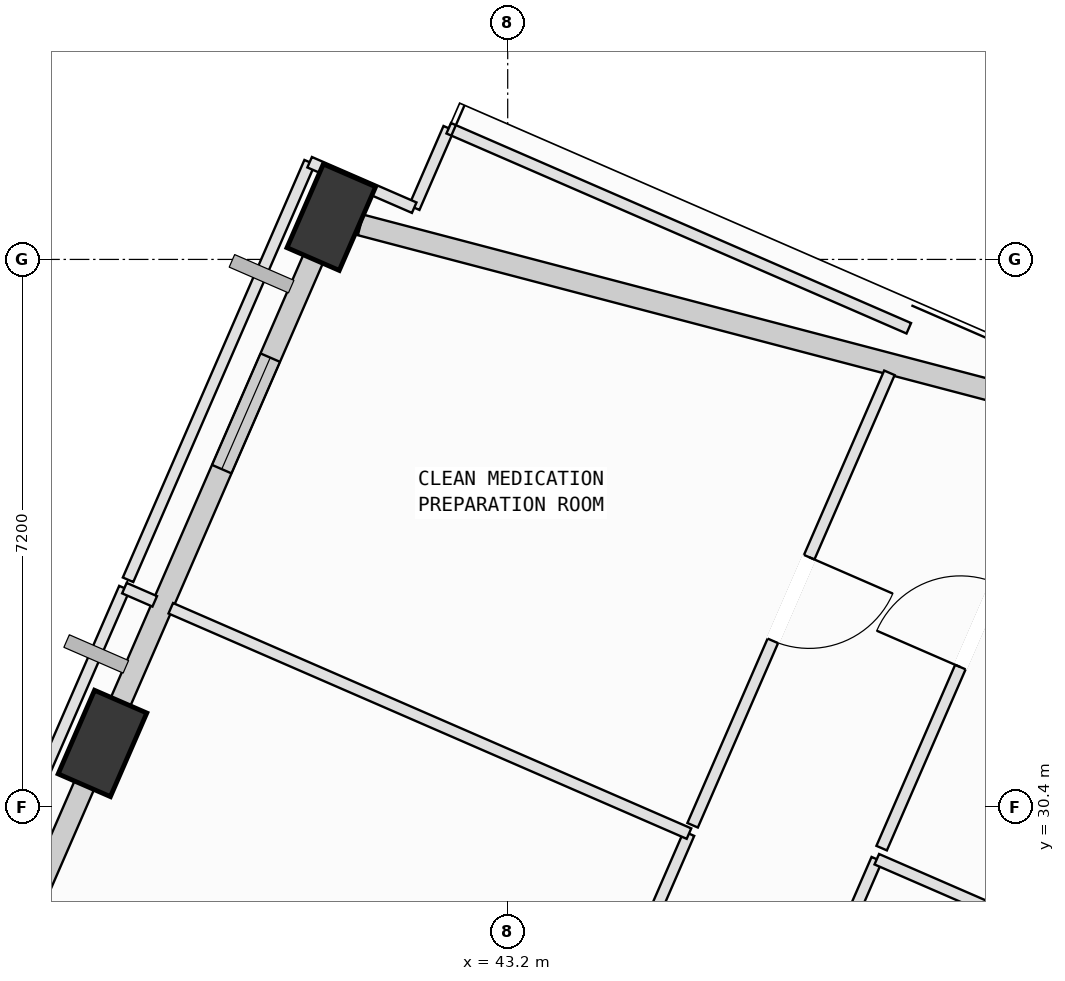
"""IFC4 building model, lengths in metres.
Left out: names, types, materials, properties, quantities, classifications, styles, units other than length and angle.
Written with IfcOpenShell. Run it as: python <this file> out.ifc"""

import sys

from ifc_helpers import new_model, si_unit, direction, frame, frame_2d, origin, origin_2d, place, context, subcontext, project, spatial, rectangle, extrude, element, fill, save


model = new_model("IFC4")
c1 = context("Model", 3, precision=1e-05, world=origin(), true_north=direction((0.0, 1.0)))
c2 = subcontext(c1, "Body", "Model", "MODEL_VIEW")
j1 = project(units=[si_unit("LENGTHUNIT", "METRE"), si_unit("PLANEANGLEUNIT", "RADIAN")], contexts=[c1])
p1 = place(None, origin())
s1 = spatial("IfcSite", under=j1, at=p1, CompositionType="ELEMENT")
p2 = place(p1, origin())
s2 = spatial("IfcBuilding", under=s1, at=p2, CompositionType="ELEMENT")
p3 = place(p2, frame((0.0, 0.0, 316.6)))
s3 = spatial("IfcBuildingStorey", under=s2, at=p3, CompositionType="ELEMENT", Elevation=316.6)
for number, where, z_axis, x_axis in (
    (1, (40.879, 38.155, 0.002), (0.0, 0.0, 1.0), (0.399, 0.917, 0.0)),
    (2, (37.868, 31.231, 0.002), (0.0, 0.0, 1.0), (0.399, 0.917, 0.0)),
):
    element("IfcColumn", number, at=place(p3, frame(where, z_axis=z_axis, x_axis=x_axis)), inside=s3, PredefinedType="COLUMN", context=c2, shape_type="SweptSolid", body=[
        extrude(rectangle(XDim=1.2, YDim=0.75, at=origin_2d()), origin(), (0.0, 0.0, 1.0), 3.996),
    ])
p4 = place(p3, frame((41.264, 38.054, 0.0), z_axis=(0.0, 0.0, 1.0), x_axis=(0.967228971308, -0.253905724755, 0.0)))
e3 = element("IfcWall", 3, at=p4, inside=s3, PredefinedType="SOLIDWALL", context=c2, shape_type="SweptSolid", body=[
    extrude(rectangle(XDim=9.02, YDim=0.28, at=frame_2d((4.51, 0.0))), origin(), (0.0, 0.0, 1.0), 3.265),
])
p5 = place(p3, frame((38.027, 31.596, 0.0), z_axis=(0.0, 0.0, 1.0), x_axis=(0.398764437463, 0.917053391802, 0.0)))
e4 = element("IfcWall", 4, at=p5, inside=s3, PredefinedType="SOLIDWALL", context=c2, shape_type="SweptSolid", body=[
    extrude(rectangle(XDim=6.755, YDim=0.28, at=frame_2d((3.377, 0.0))), origin(), (0.0, 0.0, 1.0), 3.265),
])
p6 = place(p5, frame((3.538, 0.0, 0.75)))
e5 = element("IfcOpeningElement", 5, at=p6, cuts=e4, PredefinedType="OPENING", context=c2, shape_type="SweptSolid", body=[
    extrude(rectangle(XDim=1.6, YDim=1.95, at=frame_2d((0.8, 0.975))), frame((0.0, 0.15, 0.0), z_axis=(0.0, -1.0, 0.0), x_axis=(1.0, 0.0, 0.0)), (0.0, 0.0, 1.0), 0.3),
])
p7 = place(p3, frame((35.156, 24.993, 0.0), z_axis=(0.0, 0.0, 1.0), x_axis=(0.398758169539, 0.917056117272, 0.0)))
e6 = element("IfcWall", 6, at=p7, inside=s3, PredefinedType="SOLIDWALL", context=c2, shape_type="SweptSolid", body=[
    extrude(rectangle(XDim=6.405, YDim=0.28, at=frame_2d((3.202, 0.0))), origin(), (0.0, 0.0, 1.0), 3.265),
])
p8 = place(p7, frame((2.202, 0.0, 0.75)))
e7 = element("IfcOpeningElement", 7, at=p8, cuts=e6, PredefinedType="OPENING", context=c2, shape_type="SweptSolid", body=[
    extrude(rectangle(XDim=2.0, YDim=1.95, at=frame_2d((1.0, 0.975))), frame((0.0, 0.15, 0.0), z_axis=(0.0, -1.0, 0.0), x_axis=(1.0, 0.0, 0.0)), (0.0, 0.0, 1.0), 0.3),
])
p9 = place(p3, frame((42.856, 17.749, 0.0), z_axis=(0.0, 0.0, 1.0), x_axis=(0.398751440491, 0.917059043195, 0.0)))
e8 = element("IfcWall", 8, at=p9, inside=s3, PredefinedType="PARTITIONING", context=c2, shape_type="SweptSolid", body=[
    extrude(rectangle(XDim=13.041, YDim=0.15, at=frame_2d((6.52, 0.0))), origin(), (0.0, 0.0, 1.0), 3.78),
])
p10 = place(p9, frame((5.92, 0.0, 0.0)))
e9 = element("IfcOpeningElement", 9, at=p10, cuts=e8, PredefinedType="OPENING", context=c2, shape_type="SweptSolid", body=[
    extrude(rectangle(XDim=1.2, YDim=2.15, at=frame_2d((0.6, 1.075))), frame((0.0, 0.085, 0.0), z_axis=(0.0, -1.0, 0.0), x_axis=(1.0, 0.0, 0.0)), (0.0, 0.0, 1.0), 0.17),
])
p11 = place(p3, frame((48.056, 29.708, 0.0), z_axis=(0.0, 0.0, 1.0), x_axis=(0.917068265028, -0.398730231207, 0.0)))
e10 = element("IfcWall", 10, at=p11, inside=s3, PredefinedType="PARTITIONING", context=c2, shape_type="SweptSolid", body=[
    extrude(rectangle(XDim=10.834, YDim=0.15, at=frame_2d((5.417, 0.0))), origin(), (0.0, 0.0, 1.0), 3.78),
])
p12 = place(p3, frame((48.12, 29.854, 0.0), z_axis=(0.0, 0.0, 1.0), x_axis=(0.398700984872, 0.917080980428, 0.0)))
e11 = element("IfcWall", 11, at=p12, inside=s3, PredefinedType="PARTITIONING", context=c2, shape_type="SweptSolid", body=[
    extrude(rectangle(XDim=6.395, YDim=0.15, at=frame_2d((3.198, 0.0))), origin(), (0.0, 0.0, 1.0), 2.765),
])
p13 = place(p12, frame((2.598, 0.0, 0.0)))
e12 = element("IfcOpeningElement", 12, at=p13, cuts=e11, PredefinedType="OPENING", context=c2, shape_type="SweptSolid", body=[
    extrude(rectangle(XDim=1.2, YDim=2.15, at=frame_2d((0.6, 1.075))), frame((0.0, 0.085, 0.0), z_axis=(0.0, -1.0, 0.0), x_axis=(1.0, 0.0, 0.0)), (0.0, 0.0, 1.0), 0.17),
])
p14 = place(p3, frame((45.585, 30.045, 0.0), z_axis=(0.0, 0.0, 1.0), x_axis=(-0.398687458661, -0.91708686083, 0.0)))
e13 = element("IfcWall", 13, at=p14, inside=s3, PredefinedType="PARTITIONING", context=c2, shape_type="SweptSolid", body=[
    extrude(rectangle(XDim=11.086, YDim=0.15, at=frame_2d((5.543, 0.0))), origin(), (0.0, 0.0, 1.0), 2.765),
])
p15 = place(p14, frame((4.943, 0.0, 0.0)))
e14 = element("IfcOpeningElement", 14, at=p15, cuts=e13, PredefinedType="OPENING", context=c2, shape_type="SweptSolid", body=[
    extrude(rectangle(XDim=1.2, YDim=2.15, at=frame_2d((0.6, 1.075))), frame((0.0, 0.085, 0.0), z_axis=(0.0, -1.0, 0.0), x_axis=(1.0, 0.0, 0.0)), (0.0, 0.0, 1.0), 0.17),
])
p16 = place(p3, frame((33.736, 23.108, 0.0), z_axis=(0.0, 0.0, 1.0), x_axis=(0.398761541239, 0.917054651168, 0.0)))
e15 = element("IfcWall", 15, at=p16, inside=s3, PredefinedType="PARTITIONING", context=c2, shape_type="SweptSolid", body=[
    extrude(rectangle(XDim=11.087, YDim=0.15, at=frame_2d((5.543, 0.0))), origin(), (0.0, 0.0, 1.0), 3.78),
])
p17 = place(p3, frame((38.157, 33.275, 0.0), z_axis=(0.0, 0.0, 1.0), x_axis=(0.916748651636, -0.399464528742, 0.0)))
e16 = element("IfcWall", 16, at=p17, inside=s3, PredefinedType="PARTITIONING", context=c2, shape_type="SweptSolid", body=[
    extrude(rectangle(XDim=0.435, YDim=0.15, at=frame_2d((0.218, 0.0))), origin(), (0.0, 0.0, 1.0), 3.78),
])
p18 = place(p3, frame((38.767, 33.01, 0.0), z_axis=(0.0, 0.0, 1.0), x_axis=(0.917030896956, -0.398816165707, 0.0)))
e17 = element("IfcWall", 17, at=p18, inside=s3, PredefinedType="PARTITIONING", context=c2, shape_type="SweptSolid", body=[
    extrude(rectangle(XDim=7.435, YDim=0.15, at=frame_2d((3.717, 0.0))), origin(), (0.0, 0.0, 1.0), 3.78),
])
p19 = place(p3, frame((41.97, 38.281, 0.0), z_axis=(0.0, 0.0, 1.0), x_axis=(0.398569395059, 0.917138177878, 0.0)))
e18 = element("IfcWall", 18, at=p19, inside=s3, PredefinedType="PARTITIONING", context=c2, shape_type="SweptSolid", body=[
    extrude(rectangle(XDim=1.139, YDim=0.15, at=frame_2d((0.57, 0.0))), origin(), (0.0, 0.0, 1.0), 3.78),
])
p20 = place(p3, frame((42.424, 39.326, 0.0), z_axis=(0.0, 0.0, 1.0), x_axis=(0.917064175576, -0.3987396367, 0.0)))
e19 = element("IfcWall", 19, at=p20, inside=s3, PredefinedType="PARTITIONING", context=c2, shape_type="SweptSolid", body=[
    extrude(rectangle(XDim=6.6, YDim=0.15, at=frame_2d((3.3, 0.0))), origin(), (0.0, 0.0, 1.0), 3.78),
])
p21 = place(p3, frame((48.222, 36.108, 0.0), z_axis=(0.0, 0.0, 1.0), x_axis=(-0.398811373886, -0.9170329809, 0.0)))
e20 = element("IfcWall", 20, at=p21, inside=s3, PredefinedType="PARTITIONING", context=c2, shape_type="SweptSolid", body=[
    extrude(rectangle(XDim=6.491, YDim=0.15, at=frame_2d((3.246, 0.0))), origin(), (0.0, 0.0, 1.0), 2.765),
])
p22 = place(p21, frame((2.646, 0.0, 0.0)))
e21 = element("IfcOpeningElement", 21, at=p22, cuts=e20, PredefinedType="OPENING", context=c2, shape_type="SweptSolid", body=[
    extrude(rectangle(XDim=1.2, YDim=2.15, at=frame_2d((0.6, 1.075))), frame((0.0, 0.085, 0.0), z_axis=(0.0, -1.0, 0.0), x_axis=(1.0, 0.0, 0.0)), (0.0, 0.0, 1.0), 0.17),
])
p23 = place(p3, frame((38.205, 33.385, 0.0), z_axis=(0.0, 0.0, 1.0), x_axis=(0.398763364975, 0.917053858153, 0.0)))
e22 = element("IfcWall", 22, at=p23, inside=s3, PredefinedType="PARTITIONING", context=c2, shape_type="SweptSolid", body=[
    extrude(rectangle(XDim=5.991, YDim=0.15, at=frame_2d((2.995, 0.0))), origin(), (0.0, 0.0, 1.0), 3.78),
])
p24 = place(p3, frame((40.594, 38.879, 0.0), z_axis=(0.0, 0.0, 1.0), x_axis=(0.91715541112, -0.398529737728, 0.0)))
e23 = element("IfcWall", 23, at=p24, inside=s3, PredefinedType="PARTITIONING", context=c2, shape_type="SweptSolid", body=[
    extrude(rectangle(XDim=1.5, YDim=0.15, at=frame_2d((0.75, 0.0))), origin(), (0.0, 0.0, 1.0), 3.265),
])
p25 = place(p6, origin())
e24 = element("IfcWindow", 24, at=p25, inside=s3, PartitioningType="SINGLE_PANEL", PredefinedType="WINDOW", context=c2, shape_type="SweptSolid", body=[
    extrude(rectangle(XDim=1.6, YDim=1.95, at=frame_2d((0.8, 0.975))), frame((0.0, 0.03, 0.0), z_axis=(0.0, -1.0, 0.0), x_axis=(1.0, 0.0, 0.0)), (0.0, 0.0, 1.0), 0.06),
])
fill(e5, e24)
p26 = place(p13, origin())
e25 = element("IfcDoor", 25, at=p26, inside=s3, OperationType="SINGLE_SWING_LEFT", PredefinedType="DOOR", context=c2, shape_type="SweptSolid", body=[
    extrude(rectangle(XDim=1.2, YDim=2.15, at=frame_2d((0.6, 1.075))), frame((0.0, 0.025, 0.0), z_axis=(0.0, -1.0, 0.0), x_axis=(1.0, 0.0, 0.0)), (0.0, 0.0, 1.0), 0.05),
])
fill(e12, e25)
p27 = place(p22, origin())
e26 = element("IfcDoor", 26, at=p27, inside=s3, OperationType="SINGLE_SWING_LEFT", PredefinedType="DOOR", context=c2, shape_type="SweptSolid", body=[
    extrude(rectangle(XDim=1.2, YDim=2.15, at=frame_2d((0.6, 1.075))), frame((0.0, 0.025, 0.0), z_axis=(0.0, -1.0, 0.0), x_axis=(1.0, 0.0, 0.0)), (0.0, 0.0, 1.0), 0.05),
])
fill(e21, e26)
save(model, sys.argv[1])
